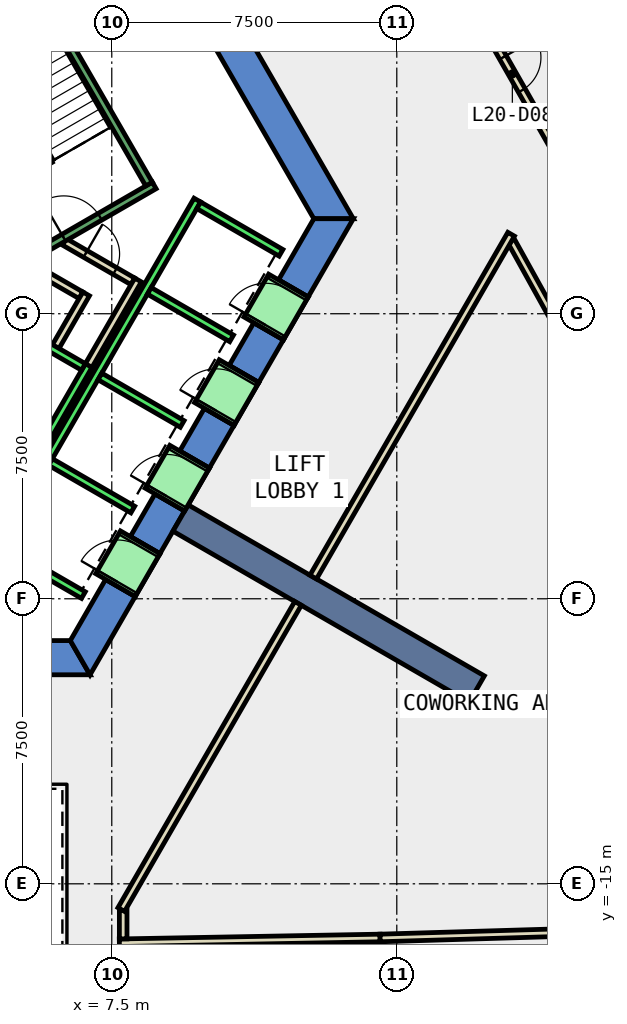
"""IFC4 building model, lengths in metres.
Left out: names, types, materials, properties, quantities, classifications, styles, units other than length and angle.
Written with IfcOpenShell. Run it as: python <this file> out.ifc"""

import sys

from ifc_helpers import new_model, si_unit, direction, frame, frame_2d, origin, place, context, subcontext, project, spatial, polyline, rectangle, outline, extrude, element, fill, save


model = new_model("IFC4")
c1 = context("Model", 3, precision=1e-05, world=origin(), true_north=direction((0.0, 1.0)))
c2 = subcontext(c1, "Body", "Model", "MODEL_VIEW")
j1 = project(units=[si_unit("LENGTHUNIT", "METRE"), si_unit("PLANEANGLEUNIT", "RADIAN")], contexts=[c1])
p1 = place(None, origin())
s1 = spatial("IfcSite", under=j1, at=p1, CompositionType="ELEMENT")
p2 = place(p1, origin())
s2 = spatial("IfcBuilding", under=s1, at=p2, CompositionType="ELEMENT")
p3 = place(p2, frame((0.0, 0.0, 95.0)))
s3 = spatial("IfcBuildingStorey", under=s2, at=p3, CompositionType="ELEMENT", Elevation=95.0)
p4 = place(p3, frame((0.0, 0.0, -0.4)))
e1 = element("IfcWall", 1, at=p4, inside=s3, PredefinedType="SHEAR", context=c2, shape_type="SweptSolid", body=[
    extrude(outline(polyline([(8.517, 11.748), (7.738, 11.298), (12.817, 2.5), (13.856, 2.5), (8.517, 11.748)])), origin(), (0.0, 0.0, 1.0), 4.2),
])
p5 = place(p3, frame((0.0, 0.0, -0.4)))
e2 = element("IfcWall", 2, at=p5, inside=s3, PredefinedType="SHEAR", context=c2, shape_type="SweptSolid", body=[
    extrude(outline(polyline([(5.75, -8.6), (5.75, -9.5), (6.928, -9.5), (6.409, -8.6), (5.75, -8.6)])), origin(), (0.0, 0.0, 1.0), 4.2),
])
p6 = place(p3, frame((0.0, 0.0, -0.4)))
e3 = element("IfcWall", 3, at=p6, inside=s3, PredefinedType="SHEAR", context=c2, shape_type="SweptSolid", body=[
    extrude(outline(polyline([(8.117, -7.44), (7.338, -6.99), (6.409, -8.6), (6.928, -9.5), (8.117, -7.44)])), origin(), (0.0, 0.0, 1.0), 4.2),
])
p7 = place(p3, frame((0.0, 0.0, -0.4)))
e4 = element("IfcWall", 4, at=p7, inside=s3, PredefinedType="SHEAR", context=c2, shape_type="SweptSolid", body=[
    extrude(outline(polyline([(9.417, -5.189), (8.638, -4.739), (7.988, -5.864), (8.767, -6.314), (9.417, -5.189)])), origin(), (0.0, 0.0, 1.0), 4.2),
])
p8 = place(p3, frame((0.0, 0.0, -0.4)))
e5 = element("IfcWall", 5, at=p8, inside=s3, PredefinedType="SHEAR", context=c2, shape_type="SweptSolid", body=[
    extrude(outline(polyline([(10.717, -2.937), (9.938, -2.487), (9.288, -3.613), (10.067, -4.063), (10.717, -2.937)])), origin(), (0.0, 0.0, 1.0), 4.2),
])
p9 = place(p3, frame((0.0, 0.0, -0.4)))
e6 = element("IfcWall", 6, at=p9, inside=s3, PredefinedType="SHEAR", context=c2, shape_type="SweptSolid", body=[
    extrude(outline(polyline([(12.017, -0.686), (11.238, -0.236), (10.588, -1.361), (11.367, -1.811), (12.017, -0.686)])), origin(), (0.0, 0.0, 1.0), 4.2),
])
p10 = place(p3, frame((0.0, 0.0, -0.4)))
e7 = element("IfcWall", 7, at=p10, inside=s3, PredefinedType="SHEAR", context=c2, shape_type="SweptSolid", body=[
    extrude(outline(polyline([(11.888, 0.89), (12.667, 0.44), (13.856, 2.5), (12.817, 2.5), (11.888, 0.89)])), origin(), (0.0, 0.0, 1.0), 4.2),
])
p11 = place(p3, frame((0.0, 0.0, 3.6)))
e8 = element("IfcWall", 8, at=p11, inside=s3, PredefinedType="SHEAR", context=c2, shape_type="SweptSolid", body=[
    extrude(outline(polyline([(8.767, -6.314), (7.988, -5.864), (7.338, -6.99), (8.117, -7.44), (8.767, -6.314)])), origin(), (0.0, 0.0, 1.0), 0.2),
])
p12 = place(p3, frame((0.0, 0.0, 3.6)))
e9 = element("IfcWall", 9, at=p12, inside=s3, PredefinedType="SHEAR", context=c2, shape_type="SweptSolid", body=[
    extrude(outline(polyline([(10.067, -4.063), (9.288, -3.613), (8.638, -4.739), (9.417, -5.189), (10.067, -4.063)])), origin(), (0.0, 0.0, 1.0), 0.2),
])
p13 = place(p3, frame((0.0, 0.0, 3.6)))
e10 = element("IfcWall", 10, at=p13, inside=s3, PredefinedType="SHEAR", context=c2, shape_type="SweptSolid", body=[
    extrude(outline(polyline([(11.367, -1.811), (10.588, -1.361), (9.938, -2.487), (10.717, -2.937), (11.367, -1.811)])), origin(), (0.0, 0.0, 1.0), 0.2),
])
p14 = place(p3, frame((0.0, 0.0, 3.6)))
e11 = element("IfcWall", 11, at=p14, inside=s3, PredefinedType="SHEAR", context=c2, shape_type="SweptSolid", body=[
    extrude(outline(polyline([(12.667, 0.44), (11.888, 0.89), (11.238, -0.236), (12.017, -0.686), (12.667, 0.44)])), origin(), (0.0, 0.0, 1.0), 0.2),
])
p15 = place(p3, frame((9.31, -5.375, -0.4), z_axis=(0.0, 0.0, 1.0), x_axis=(0.866017533419, -0.500013631625, 0.0)))
e12 = element("IfcWall", 12, at=p15, inside=s3, PredefinedType="SHEAR", context=c2, shape_type="SweptSolid", body=[
    extrude(rectangle(XDim=9.0, YDim=0.8, at=frame_2d((4.5, 0.0))), origin(), (0.0, 0.0, 1.0), 4.2),
])
p16 = place(p3, frame((7.7, -16.551, 0.0), z_axis=(0.0, 0.0, 1.0), x_axis=(0.999831478914, 0.018357934851, 0.0)))
e13 = element("IfcWall", 13, at=p16, inside=s3, PredefinedType="PARTITIONING", context=c2, shape_type="SweptSolid", body=[
    extrude(rectangle(XDim=6.862, YDim=0.2, at=frame_2d((3.431, 0.0))), origin(), (0.0, 0.0, 1.0), 3.8),
])
p17 = place(p3, frame((14.561, -16.425, 0.0), z_axis=(0.0, 0.0, 1.0), x_axis=(0.99955668677, 0.029772973188, 0.0)))
e14 = element("IfcWall", 14, at=p17, inside=s3, PredefinedType="PARTITIONING", context=c2, shape_type="SweptSolid", body=[
    extrude(rectangle(XDim=6.888, YDim=0.2, at=frame_2d((3.444, 0.0))), origin(), (0.0, 0.0, 1.0), 3.8),
])
p18 = place(p3, frame((21.317, -4.053, 0.0), z_axis=(0.0, 0.0, 1.0), x_axis=(-0.484816829319, 0.874615711046, 0.0)))
e15 = element("IfcWall", 15, at=p18, inside=s3, PredefinedType="PARTITIONING", context=c2, shape_type="SweptSolid", body=[
    extrude(rectangle(XDim=6.827, YDim=0.2, at=frame_2d((3.414, 0.0))), origin(), (0.0, 0.0, 1.0), 3.8),
])
p19 = place(p3, frame((16.243, 9.465, 0.0), z_axis=(0.0, 0.0, 1.0), x_axis=(0.495081262009, -0.868846674625, 0.0)))
e16 = element("IfcWall", 16, at=p19, inside=s3, PredefinedType="PARTITIONING", context=c2, shape_type="SweptSolid", body=[
    extrude(rectangle(XDim=7.112, YDim=0.2, at=frame_2d((3.556, 0.0))), origin(), (0.0, 0.0, 1.0), 3.8),
])
p20 = place(p19, frame((3.131, 0.0, 0.0)))
e17 = element("IfcOpeningElement", 17, at=p20, cuts=e16, PredefinedType="OPENING", context=c2, shape_type="SweptSolid", body=[
    extrude(rectangle(XDim=1.0, YDim=2.1, at=frame_2d((0.5, 1.05))), frame((0.0, 0.11, 0.0), z_axis=(0.0, -1.0, 0.0), x_axis=(1.0, 0.0, 0.0)), (0.0, 0.0, 1.0), 0.22),
])
p21 = place(p3, frame((5.499, 1.172, 0.0), z_axis=(0.0, 0.0, 1.0), x_axis=(0.866333505267, -0.499465972466, 0.0)))
e18 = element("IfcWall", 18, at=p21, inside=s3, PredefinedType="PARTITIONING", context=c2, shape_type="SweptSolid", body=[
    extrude(rectangle(XDim=1.374, YDim=0.2, at=frame_2d((0.687, 0.0))), origin(), (0.0, 0.0, 1.0), 3.8),
])
p22 = place(p3, frame((6.826, 0.522, 0.0), z_axis=(0.0, 0.0, 1.0), x_axis=(-0.500016722714, -0.866015748706, 0.0)))
e19 = element("IfcWall", 19, at=p22, inside=s3, PredefinedType="PARTITIONING", context=c2, shape_type="SweptSolid", body=[
    extrude(rectangle(XDim=1.7, YDim=0.2, at=frame_2d((0.85, 0.0))), origin(), (0.0, 0.0, 1.0), 3.8),
])
p23 = place(p3, frame((6.25, 1.894, 0.0), z_axis=(0.0, 0.0, 1.0), x_axis=(0.866043184279, -0.499969202016, 0.0)))
e20 = element("IfcWall", 20, at=p23, inside=s3, PredefinedType="PARTITIONING", context=c2, shape_type="SweptSolid", body=[
    extrude(rectangle(XDim=2.084, YDim=0.2, at=frame_2d((1.042, 0.0))), origin(), (0.0, 0.0, 1.0), 3.8),
])
p24 = place(p23, frame((0.642, 0.0, 0.0)))
e21 = element("IfcOpeningElement", 21, at=p24, cuts=e20, PredefinedType="OPENING", context=c2, shape_type="SweptSolid", body=[
    extrude(rectangle(XDim=0.9, YDim=2.1, at=frame_2d((0.45, 1.05))), frame((0.0, 0.11, 0.0), z_axis=(0.0, -1.0, 0.0), x_axis=(1.0, 0.0, 0.0)), (0.0, 0.0, 1.0), 0.22),
])
p25 = place(p3, frame((8.192, 0.888, 0.0), z_axis=(0.0, 0.0, 1.0), x_axis=(-0.499940625693, -0.866059680843, 0.0)))
e22 = element("IfcWall", 22, at=p25, inside=s3, PredefinedType="PARTITIONING", context=c2, shape_type="SweptSolid", body=[
    extrude(rectangle(XDim=2.68, YDim=0.2, at=frame_2d((1.34, 0.0))), origin(), (0.0, 0.0, 1.0), 3.8),
])
p26 = place(p3, frame((7.8, -15.69, 0.0), z_axis=(0.0, 0.0, 1.0), x_axis=(0.0, -1.0, 0.0)))
e23 = element("IfcWall", 23, at=p26, inside=s3, PredefinedType="PARTITIONING", context=c2, shape_type="SweptSolid", body=[
    extrude(rectangle(XDim=0.759, YDim=0.2, at=frame_2d((0.379, 0.0))), origin(), (0.0, 0.0, 1.0), 3.8),
])
p27 = place(p3, frame((18.009, 2.092, 0.0), z_axis=(0.0, 0.0, 1.0), x_axis=(-0.499980796252, -0.866036490789, 0.0)))
e24 = element("IfcWall", 24, at=p27, inside=s3, PredefinedType="PARTITIONING", context=c2, shape_type="SweptSolid", body=[
    extrude(rectangle(XDim=10.417, YDim=0.2, at=frame_2d((5.208, 0.0))), origin(), (0.0, 0.0, 1.0), 3.8),
])
p28 = place(p3, frame((12.401, -7.621, 0.0), z_axis=(0.0, 0.0, 1.0), x_axis=(-0.499983724212, -0.866034800411, 0.0)))
e25 = element("IfcWall", 25, at=p28, inside=s3, PredefinedType="PARTITIONING", context=c2, shape_type="SweptSolid", body=[
    extrude(rectangle(XDim=9.302, YDim=0.2, at=frame_2d((4.651, 0.0))), origin(), (0.0, 0.0, 1.0), 3.8),
])
p29 = place(p3, frame((5.492, -3.788, 0.0), z_axis=(0.0, 0.0, 1.0), x_axis=(0.500011755427, 0.866018616679, 0.0)))
e26 = element("IfcWall", 26, at=p29, inside=s3, PredefinedType="STANDARD", context=c2, shape_type="SweptSolid", body=[
    extrude(rectangle(XDim=2.8, YDim=0.2, at=frame_2d((1.4, 0.0))), origin(), (0.0, 0.0, 1.0), 3.8),
])
p30 = place(p3, frame((4.677, -0.2, 0.0), z_axis=(0.0, 0.0, 1.0), x_axis=(0.865973769406, -0.500089422704, 0.0)))
e27 = element("IfcWall", 27, at=p30, inside=s3, PredefinedType="STANDARD", context=c2, shape_type="SweptSolid", body=[
    extrude(rectangle(XDim=2.399, YDim=0.2, at=frame_2d((1.2, 0.0))), origin(), (0.0, 0.0, 1.0), 3.8),
])
p31 = place(p3, frame((4.451, -6.19, 0.0), z_axis=(0.0, 0.0, 1.0), x_axis=(0.50000090737, 0.866024879913, 0.0)))
e28 = element("IfcWall", 28, at=p31, inside=s3, PredefinedType="STANDARD", context=c2, shape_type="SweptSolid", body=[
    extrude(rectangle(XDim=10.6, YDim=0.2, at=frame_2d((5.3, 0.0))), origin(), (0.0, 0.0, 1.0), 3.8),
])
for number, where, z_axis, x_axis in (
    (29, (4.588, -6.153, 0.0), (0.0, 0.0, 1.0), (0.866, -0.5, 0.0)),
    (30, (5.888, -3.902, 0.0), (0.0, 0.0, 1.0), (0.866, -0.5, 0.0)),
    (31, (7.188, -1.65, 0.0), (0.0, 0.0, 1.0), (0.866, -0.5, 0.0)),
    (32, (8.488, 0.602, 0.0), (0.0, 0.0, 1.0), (0.866, -0.5, 0.0)),
):
    element("IfcWall", number, at=place(p3, frame(where, z_axis=z_axis, x_axis=x_axis)), inside=s3, PredefinedType="STANDARD", context=c2, shape_type="SweptSolid", body=[
        extrude(rectangle(XDim=2.5, YDim=0.2, at=frame_2d((1.25, 0.0))), origin(), (0.0, 0.0, 1.0), 3.8),
    ])
p32 = place(p3, frame((9.788, 2.853, 0.0), z_axis=(0.0, 0.0, 1.0), x_axis=(0.865998541277, -0.500046524342, 0.0)))
e33 = element("IfcWall", 33, at=p32, inside=s3, PredefinedType="STANDARD", context=c2, shape_type="SweptSolid", body=[
    extrude(rectangle(XDim=2.5, YDim=0.2, at=frame_2d((1.25, 0.0))), origin(), (0.0, 0.0, 1.0), 3.8),
])
p33 = place(p3, frame((7.598, -7.14, 0.0), z_axis=(0.0, 0.0, 1.0), x_axis=(0.500362116554, 0.865816234728, 0.0)))
e34 = element("IfcWall", 34, at=p33, inside=s3, PredefinedType="STANDARD", context=c2, shape_type="SweptSolid", body=[
    extrude(rectangle(XDim=1.299, YDim=1.2, at=frame_2d((0.65, 0.0))), origin(), (0.0, 0.0, 1.0), 2.4),
])
p34 = place(p33, frame((0.1, 0.0, 0.0)))
e35 = element("IfcOpeningElement", 35, at=p34, cuts=e34, PredefinedType="OPENING", context=c2, shape_type="SweptSolid", body=[
    extrude(rectangle(XDim=1.1, YDim=2.3, at=frame_2d((0.55, 1.15))), frame((0.0, 0.61, 0.0), z_axis=(0.0, -1.0, 0.0), x_axis=(1.0, 0.0, 0.0)), (0.0, 0.0, 1.0), 1.22),
])
p35 = place(p3, frame((8.898, -4.889, 0.0), z_axis=(0.0, 0.0, 1.0), x_axis=(0.500036693733, 0.866004217611, 0.0)))
e36 = element("IfcWall", 36, at=p35, inside=s3, PredefinedType="STANDARD", context=c2, shape_type="SweptSolid", body=[
    extrude(rectangle(XDim=1.3, YDim=1.2, at=frame_2d((0.65, 0.0))), origin(), (0.0, 0.0, 1.0), 2.4),
])
p36 = place(p35, frame((0.1, 0.0, 0.0)))
e37 = element("IfcOpeningElement", 37, at=p36, cuts=e36, PredefinedType="OPENING", context=c2, shape_type="SweptSolid", body=[
    extrude(rectangle(XDim=1.1, YDim=2.3, at=frame_2d((0.55, 1.15))), frame((0.0, 0.61, 0.0), z_axis=(0.0, -1.0, 0.0), x_axis=(1.0, 0.0, 0.0)), (0.0, 0.0, 1.0), 1.22),
])
p37 = place(p3, frame((10.198, -2.637, 0.0), z_axis=(0.0, 0.0, 1.0), x_axis=(0.49989585183, 0.866085525409, 0.0)))
e38 = element("IfcWall", 38, at=p37, inside=s3, PredefinedType="STANDARD", context=c2, shape_type="SweptSolid", body=[
    extrude(rectangle(XDim=1.3, YDim=1.2, at=frame_2d((0.65, 0.0))), origin(), (0.0, 0.0, 1.0), 2.4),
])
p38 = place(p37, frame((0.1, 0.0, 0.0)))
e39 = element("IfcOpeningElement", 39, at=p38, cuts=e38, PredefinedType="OPENING", context=c2, shape_type="SweptSolid", body=[
    extrude(rectangle(XDim=1.1, YDim=2.3, at=frame_2d((0.55, 1.15))), frame((0.0, 0.61, 0.0), z_axis=(0.0, -1.0, 0.0), x_axis=(1.0, 0.0, 0.0)), (0.0, 0.0, 1.0), 1.22),
])
p39 = place(p3, frame((11.498, -0.385, 0.0), z_axis=(0.0, 0.0, 1.0), x_axis=(0.500221244143, 0.865897630733, 0.0)))
e40 = element("IfcWall", 40, at=p39, inside=s3, PredefinedType="STANDARD", context=c2, shape_type="SweptSolid", body=[
    extrude(rectangle(XDim=1.299, YDim=1.2, at=frame_2d((0.65, 0.0))), origin(), (0.0, 0.0, 1.0), 2.4),
])
p40 = place(p39, frame((0.1, 0.0, 0.0)))
e41 = element("IfcOpeningElement", 41, at=p40, cuts=e40, PredefinedType="OPENING", context=c2, shape_type="SweptSolid", body=[
    extrude(rectangle(XDim=1.1, YDim=2.3, at=frame_2d((0.55, 1.15))), frame((0.0, 0.61, 0.0), z_axis=(0.0, -1.0, 0.0), x_axis=(1.0, 0.0, 0.0)), (0.0, 0.0, 1.0), 1.22),
])
p41 = place(p3, frame((4.806, 1.176, 0.0), z_axis=(0.0, 0.0, 1.0), x_axis=(0.866059941101, 0.499940174841, 0.0)))
e42 = element("IfcWall", 42, at=p41, inside=s3, PredefinedType="STANDARD", context=c2, shape_type="SweptSolid", body=[
    extrude(rectangle(XDim=4.4, YDim=0.2, at=frame_2d((2.2, 0.0))), origin(), (0.0, 0.0, 1.0), 3.8),
])
p42 = place(p41, frame((1.65, 0.0, 0.0)))
e43 = element("IfcOpeningElement", 43, at=p42, cuts=e42, PredefinedType="OPENING", context=c2, shape_type="SweptSolid", body=[
    extrude(rectangle(XDim=1.1, YDim=2.2, at=frame_2d((0.55, 1.1))), frame((0.0, 0.11, 0.0), z_axis=(0.0, -1.0, 0.0), x_axis=(1.0, 0.0, 0.0)), (0.0, 0.0, 1.0), 0.22),
])
p43 = place(p3, frame((8.48, 3.412, 0.0), z_axis=(0.0, 0.0, 1.0), x_axis=(-0.499978703459, 0.866037698999, 0.0)))
e44 = element("IfcWall", 44, at=p43, inside=s3, PredefinedType="STANDARD", context=c2, shape_type="SweptSolid", body=[
    extrude(rectangle(XDim=6.9, YDim=0.2, at=frame_2d((3.45, 0.0))), origin(), (0.0, 0.0, 1.0), 3.8),
])
p44 = place(p20, origin())
e45 = element("IfcDoor", 45, at=p44, inside=s3, OperationType="SINGLE_SWING_LEFT", PredefinedType="DOOR", context=c2, shape_type="SweptSolid", body=[
    extrude(rectangle(XDim=1.0, YDim=2.1, at=frame_2d((0.5, 1.05))), frame((0.0, 0.025, 0.0), z_axis=(0.0, -1.0, 0.0), x_axis=(1.0, 0.0, 0.0)), (0.0, 0.0, 1.0), 0.05),
])
fill(e17, e45)
p45 = place(p24, origin())
e46 = element("IfcDoor", 46, at=p45, inside=s3, OperationType="SINGLE_SWING_LEFT", PredefinedType="DOOR", context=c2, shape_type="SweptSolid", body=[
    extrude(rectangle(XDim=0.9, YDim=2.1, at=frame_2d((0.45, 1.05))), frame((0.0, 0.025, 0.0), z_axis=(0.0, -1.0, 0.0), x_axis=(1.0, 0.0, 0.0)), (0.0, 0.0, 1.0), 0.05),
])
fill(e21, e46)
p46 = place(p34, origin())
e47 = element("IfcDoor", 47, at=p46, inside=s3, OperationType="SLIDING_TO_LEFT", PredefinedType="DOOR", context=c2, shape_type="SweptSolid", body=[
    extrude(rectangle(XDim=1.1, YDim=2.3, at=frame_2d((0.55, 1.15))), frame((0.0, 0.025, 0.0), z_axis=(0.0, -1.0, 0.0), x_axis=(1.0, 0.0, 0.0)), (0.0, 0.0, 1.0), 0.05),
])
fill(e35, e47)
p47 = place(p36, origin())
e48 = element("IfcDoor", 48, at=p47, inside=s3, OperationType="SLIDING_TO_LEFT", PredefinedType="DOOR", context=c2, shape_type="SweptSolid", body=[
    extrude(rectangle(XDim=1.1, YDim=2.3, at=frame_2d((0.55, 1.15))), frame((0.0, 0.025, 0.0), z_axis=(0.0, -1.0, 0.0), x_axis=(1.0, 0.0, 0.0)), (0.0, 0.0, 1.0), 0.05),
])
fill(e37, e48)
p48 = place(p38, origin())
e49 = element("IfcDoor", 49, at=p48, inside=s3, OperationType="SLIDING_TO_LEFT", PredefinedType="DOOR", context=c2, shape_type="SweptSolid", body=[
    extrude(rectangle(XDim=1.1, YDim=2.3, at=frame_2d((0.55, 1.15))), frame((0.0, 0.025, 0.0), z_axis=(0.0, -1.0, 0.0), x_axis=(1.0, 0.0, 0.0)), (0.0, 0.0, 1.0), 0.05),
])
fill(e39, e49)
p49 = place(p40, origin())
e50 = element("IfcDoor", 50, at=p49, inside=s3, OperationType="SLIDING_TO_LEFT", PredefinedType="DOOR", context=c2, shape_type="SweptSolid", body=[
    extrude(rectangle(XDim=1.1, YDim=2.3, at=frame_2d((0.55, 1.15))), frame((0.0, 0.025, 0.0), z_axis=(0.0, -1.0, 0.0), x_axis=(1.0, 0.0, 0.0)), (0.0, 0.0, 1.0), 0.05),
])
fill(e41, e50)
p50 = place(p42, origin())
e51 = element("IfcDoor", 51, at=p50, inside=s3, OperationType="SINGLE_SWING_LEFT", PredefinedType="DOOR", context=c2, shape_type="SweptSolid", body=[
    extrude(rectangle(XDim=1.1, YDim=2.2, at=frame_2d((0.55, 1.1))), frame((0.0, 0.025, 0.0), z_axis=(0.0, -1.0, 0.0), x_axis=(1.0, 0.0, 0.0)), (0.0, 0.0, 1.0), 0.05),
])
fill(e43, e51)
save(model, sys.argv[1])
